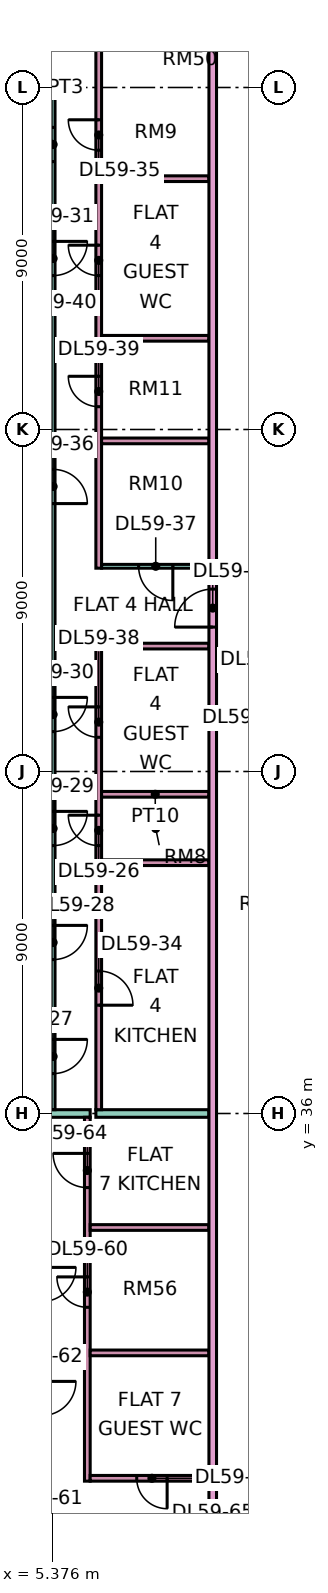
"""IFC4 building model, lengths in metres.
Left out: names, types, materials, properties, quantities, classifications, styles, units other than length and angle.
Written with IfcOpenShell. Run it as: python <this file> out.ifc"""

import sys

from ifc_helpers import new_model, si_unit, direction, frame, frame_2d, origin, place, context, subcontext, project, spatial, rectangle, extrude, element, fill, save


model = new_model("IFC4")
c1 = context("Model", 3, precision=1e-05, world=origin(), true_north=direction((0.0, 1.0)))
c2 = subcontext(c1, "Body", "Model", "MODEL_VIEW")
j1 = project(units=[si_unit("LENGTHUNIT", "METRE"), si_unit("PLANEANGLEUNIT", "RADIAN")], contexts=[c1])
p1 = place(None, origin())
s1 = spatial("IfcSite", under=j1, at=p1, CompositionType="ELEMENT")
p2 = place(p1, origin())
s2 = spatial("IfcBuilding", under=s1, at=p2, CompositionType="ELEMENT")
p3 = place(p2, frame((0.0, 0.0, 249.15)))
s3 = spatial("IfcBuildingStorey", under=s2, at=p3, CompositionType="ELEMENT", Elevation=249.15)
p4 = place(p3, frame((0.0, 36.0, 0.0), z_axis=(0.0, 0.0, 1.0), x_axis=(1.0, 0.0, 0.0)))
e1 = element("IfcWall", 1, at=p4, inside=s3, PredefinedType="PARTITIONING", context=c2, shape_type="SweptSolid", body=[
    extrude(rectangle(XDim=6.375, YDim=0.2, at=frame_2d((3.188, 0.0))), origin(), (0.0, 0.0, 1.0), 3.35),
])
p5 = place(p3, frame((5.4, 36.1, 0.0), z_axis=(0.0, 0.0, 1.0), x_axis=(0.0, 1.0, 0.0)))
e2 = element("IfcWall", 2, at=p5, inside=s3, PredefinedType="PARTITIONING", context=c2, shape_type="SweptSolid", body=[
    extrude(rectangle(XDim=26.95, YDim=0.1, at=frame_2d((13.475, 0.0))), origin(), (0.0, 0.0, 1.0), 3.35),
])
p6 = place(p5, frame((0.95, 0.0, 0.0)))
e3 = element("IfcOpeningElement", 3, at=p6, cuts=e2, PredefinedType="OPENING", context=c2, shape_type="SweptSolid", body=[
    extrude(rectangle(XDim=0.9, YDim=2.1, at=frame_2d((0.45, 1.05))), frame((0.0, 0.06, 0.0), z_axis=(0.0, -1.0, 0.0), x_axis=(1.0, 0.0, 0.0)), (0.0, 0.0, 1.0), 0.12),
])
p7 = place(p5, frame((3.95, 0.0, 0.0)))
e4 = element("IfcOpeningElement", 4, at=p7, cuts=e2, PredefinedType="OPENING", context=c2, shape_type="SweptSolid", body=[
    extrude(rectangle(XDim=0.9, YDim=2.1, at=frame_2d((0.45, 1.05))), frame((0.0, 0.06, 0.0), z_axis=(0.0, -1.0, 0.0), x_axis=(1.0, 0.0, 0.0)), (0.0, 0.0, 1.0), 0.12),
])
p8 = place(p5, frame((6.95, 0.0, 0.0)))
e5 = element("IfcOpeningElement", 5, at=p8, cuts=e2, PredefinedType="OPENING", context=c2, shape_type="SweptSolid", body=[
    extrude(rectangle(XDim=0.9, YDim=2.1, at=frame_2d((0.45, 1.05))), frame((0.0, 0.06, 0.0), z_axis=(0.0, -1.0, 0.0), x_axis=(1.0, 0.0, 0.0)), (0.0, 0.0, 1.0), 0.12),
])
p9 = place(p5, frame((9.95, 0.0, 0.0)))
e6 = element("IfcOpeningElement", 6, at=p9, cuts=e2, PredefinedType="OPENING", context=c2, shape_type="SweptSolid", body=[
    extrude(rectangle(XDim=0.9, YDim=2.1, at=frame_2d((0.45, 1.05))), frame((0.0, 0.06, 0.0), z_axis=(0.0, -1.0, 0.0), x_axis=(1.0, 0.0, 0.0)), (0.0, 0.0, 1.0), 0.12),
])
p10 = place(p5, frame((21.95, 0.0, 0.0)))
e7 = element("IfcOpeningElement", 7, at=p10, cuts=e2, PredefinedType="OPENING", context=c2, shape_type="SweptSolid", body=[
    extrude(rectangle(XDim=0.9, YDim=2.1, at=frame_2d((0.45, 1.05))), frame((0.0, 0.06, 0.0), z_axis=(0.0, -1.0, 0.0), x_axis=(1.0, 0.0, 0.0)), (0.0, 0.0, 1.0), 0.12),
])
p11 = place(p5, frame((24.95, 0.0, 0.0)))
e8 = element("IfcOpeningElement", 8, at=p11, cuts=e2, PredefinedType="OPENING", context=c2, shape_type="SweptSolid", body=[
    extrude(rectangle(XDim=0.9, YDim=2.1, at=frame_2d((0.45, 1.05))), frame((0.0, 0.06, 0.0), z_axis=(0.0, -1.0, 0.0), x_axis=(1.0, 0.0, 0.0)), (0.0, 0.0, 1.0), 0.12),
])
p12 = place(p5, frame((15.95, 0.0, 0.0)))
e9 = element("IfcOpeningElement", 9, at=p12, cuts=e2, PredefinedType="OPENING", context=c2, shape_type="SweptSolid", body=[
    extrude(rectangle(XDim=0.9, YDim=2.1, at=frame_2d((0.45, 1.05))), frame((0.0, 0.06, 0.0), z_axis=(0.0, -1.0, 0.0), x_axis=(1.0, 0.0, 0.0)), (0.0, 0.0, 1.0), 0.12),
])
p13 = place(p3, frame((5.45, 63.0, 0.0), z_axis=(0.0, 0.0, 1.0), x_axis=(1.0, 0.0, 0.0)))
e10 = element("IfcWall", 10, at=p13, inside=s3, PredefinedType="PARTITIONING", context=c2, shape_type="SweptSolid", body=[
    extrude(rectangle(XDim=0.55, YDim=0.1, at=frame_2d((0.275, 0.0))), origin(), (0.0, 0.0, 1.0), 3.35),
])
p14 = place(p3, frame((6.3, 26.325, 0.0), z_axis=(0.0, 0.0, 1.0), x_axis=(0.0, 1.0, 0.0)))
e11 = element("IfcWall", 11, at=p14, inside=s3, PredefinedType="PARTITIONING", context=c2, shape_type="SweptSolid", body=[
    extrude(rectangle(XDim=9.575, YDim=0.15, at=frame_2d((4.788, 0.0))), origin(), (0.0, 0.0, 1.0), 3.35),
])
p15 = place(p14, frame((4.575, 0.0, 0.0)))
e12 = element("IfcOpeningElement", 12, at=p15, cuts=e11, PredefinedType="OPENING", context=c2, shape_type="SweptSolid", body=[
    extrude(rectangle(XDim=0.8, YDim=2.1, at=frame_2d((0.4, 1.05))), frame((0.0, 0.085, 0.0), z_axis=(0.0, -1.0, 0.0), x_axis=(1.0, 0.0, 0.0)), (0.0, 0.0, 1.0), 0.17),
])
p16 = place(p14, frame((7.725, 0.0, 0.0)))
e13 = element("IfcOpeningElement", 13, at=p16, cuts=e11, PredefinedType="OPENING", context=c2, shape_type="SweptSolid", body=[
    extrude(rectangle(XDim=0.9, YDim=2.1, at=frame_2d((0.45, 1.05))), frame((0.0, 0.085, 0.0), z_axis=(0.0, -1.0, 0.0), x_axis=(1.0, 0.0, 0.0)), (0.0, 0.0, 1.0), 0.17),
])
p17 = place(p3, frame((6.375, 26.4, 0.0), z_axis=(0.0, 0.0, 1.0), x_axis=(1.0, 0.0, 0.0)))
e14 = element("IfcWall", 14, at=p17, inside=s3, PredefinedType="PARTITIONING", context=c2, shape_type="SweptSolid", body=[
    extrude(rectangle(XDim=3.125, YDim=0.15, at=frame_2d((1.562, 0.0))), origin(), (0.0, 0.0, 1.0), 3.35),
])
p18 = place(p17, frame((1.225, 0.0, 0.0)))
e15 = element("IfcOpeningElement", 15, at=p18, cuts=e14, PredefinedType="OPENING", context=c2, shape_type="SweptSolid", body=[
    extrude(rectangle(XDim=0.8, YDim=2.1, at=frame_2d((0.4, 1.05))), frame((0.0, 0.085, 0.0), z_axis=(0.0, -1.0, 0.0), x_axis=(1.0, 0.0, 0.0)), (0.0, 0.0, 1.0), 0.17),
])
for number, where, z_axis, x_axis in (
    (16, (6.375, 29.7, 0.0), (0.0, 0.0, 1.0), (1.0, 0.0, 0.0)),
    (17, (6.375, 33.0, 0.0), (0.0, 0.0, 1.0), (1.0, 0.0, 0.0)),
):
    element("IfcWall", number, at=place(p3, frame(where, z_axis=z_axis, x_axis=x_axis)), inside=s3, PredefinedType="PARTITIONING", context=c2, shape_type="SweptSolid", body=[
        extrude(rectangle(XDim=3.125, YDim=0.15, at=frame_2d((1.562, 0.0))), origin(), (0.0, 0.0, 1.0), 3.35),
    ])
p19 = place(p3, frame((6.525, 36.0, 0.0), z_axis=(0.0, 0.0, 1.0), x_axis=(1.0, 0.0, 0.0)))
e18 = element("IfcWall", 18, at=p19, inside=s3, PredefinedType="PARTITIONING", context=c2, shape_type="SweptSolid", body=[
    extrude(rectangle(XDim=2.975, YDim=0.2, at=frame_2d((1.488, 0.0))), origin(), (0.0, 0.0, 1.0), 3.35),
])
p20 = place(p3, frame((6.6, 36.1, 0.0), z_axis=(0.0, 0.0, 1.0), x_axis=(0.0, 1.0, 0.0)))
e19 = element("IfcWall", 19, at=p20, inside=s3, PredefinedType="PARTITIONING", context=c2, shape_type="SweptSolid", body=[
    extrude(rectangle(XDim=12.275, YDim=0.15, at=frame_2d((6.137, 0.0))), origin(), (0.0, 0.0, 1.0), 3.35),
])
p21 = place(p20, frame((6.95, 0.0, 0.0)))
e20 = element("IfcOpeningElement", 20, at=p21, cuts=e19, PredefinedType="OPENING", context=c2, shape_type="SweptSolid", body=[
    extrude(rectangle(XDim=0.8, YDim=2.1, at=frame_2d((0.4, 1.05))), frame((0.0, 0.085, 0.0), z_axis=(0.0, -1.0, 0.0), x_axis=(1.0, 0.0, 0.0)), (0.0, 0.0, 1.0), 0.17),
])
p22 = place(p20, frame((2.75, 0.0, 0.0)))
e21 = element("IfcOpeningElement", 21, at=p22, cuts=e19, PredefinedType="OPENING", context=c2, shape_type="SweptSolid", body=[
    extrude(rectangle(XDim=0.9, YDim=2.1, at=frame_2d((0.45, 1.05))), frame((0.0, 0.085, 0.0), z_axis=(0.0, -1.0, 0.0), x_axis=(1.0, 0.0, 0.0)), (0.0, 0.0, 1.0), 0.17),
])
p23 = place(p20, frame((9.8, 0.0, 0.0)))
e22 = element("IfcOpeningElement", 22, at=p23, cuts=e19, PredefinedType="OPENING", context=c2, shape_type="SweptSolid", body=[
    extrude(rectangle(XDim=0.8, YDim=2.1, at=frame_2d((0.4, 1.05))), frame((0.0, 0.085, 0.0), z_axis=(0.0, -1.0, 0.0), x_axis=(1.0, 0.0, 0.0)), (0.0, 0.0, 1.0), 0.17),
])
p24 = place(p3, frame((6.6, 50.35, 0.0), z_axis=(0.0, 0.0, 1.0), x_axis=(0.0, 1.0, 0.0)))
e23 = element("IfcWall", 23, at=p24, inside=s3, PredefinedType="PARTITIONING", context=c2, shape_type="SweptSolid", body=[
    extrude(rectangle(XDim=14.0, YDim=0.15, at=frame_2d((7.0, 0.0))), origin(), (0.0, 0.0, 1.0), 3.35),
])
p25 = place(p24, frame((11.0, 0.0, 0.0)))
e24 = element("IfcOpeningElement", 24, at=p25, cuts=e23, PredefinedType="OPENING", context=c2, shape_type="SweptSolid", body=[
    extrude(rectangle(XDim=0.8, YDim=2.1, at=frame_2d((0.4, 1.05))), frame((0.0, 0.085, 0.0), z_axis=(0.0, -1.0, 0.0), x_axis=(1.0, 0.0, 0.0)), (0.0, 0.0, 1.0), 0.17),
])
p26 = place(p24, frame((4.25, 0.0, 0.0)))
e25 = element("IfcOpeningElement", 25, at=p26, cuts=e23, PredefinedType="OPENING", context=c2, shape_type="SweptSolid", body=[
    extrude(rectangle(XDim=0.8, YDim=2.1, at=frame_2d((0.4, 1.05))), frame((0.0, 0.085, 0.0), z_axis=(0.0, -1.0, 0.0), x_axis=(1.0, 0.0, 0.0)), (0.0, 0.0, 1.0), 0.17),
])
p27 = place(p24, frame((7.7, 0.0, 0.0)))
e26 = element("IfcOpeningElement", 26, at=p27, cuts=e23, PredefinedType="OPENING", context=c2, shape_type="SweptSolid", body=[
    extrude(rectangle(XDim=0.8, YDim=2.1, at=frame_2d((0.4, 1.05))), frame((0.0, 0.085, 0.0), z_axis=(0.0, -1.0, 0.0), x_axis=(1.0, 0.0, 0.0)), (0.0, 0.0, 1.0), 0.17),
])
for number, where, z_axis, x_axis in (
    (27, (6.675, 42.6, 0.0), (0.0, 0.0, 1.0), (1.0, 0.0, 0.0)),
    (28, (6.675, 44.4, 0.0), (0.0, 0.0, 1.0), (1.0, 0.0, 0.0)),
    (29, (6.675, 48.3, 0.0), (0.0, 0.0, 1.0), (1.0, 0.0, 0.0)),
):
    element("IfcWall", number, at=place(p3, frame(where, z_axis=z_axis, x_axis=x_axis)), inside=s3, PredefinedType="PARTITIONING", context=c2, shape_type="SweptSolid", body=[
        extrude(rectangle(XDim=2.825, YDim=0.15, at=frame_2d((1.413, 0.0))), origin(), (0.0, 0.0, 1.0), 3.35),
    ])
p28 = place(p3, frame((6.675, 50.4, 0.0), z_axis=(0.0, 0.0, 1.0), x_axis=(1.0, 0.0, 0.0)))
e30 = element("IfcWall", 30, at=p28, inside=s3, PredefinedType="PARTITIONING", context=c2, shape_type="SweptSolid", body=[
    extrude(rectangle(XDim=2.825, YDim=0.1, at=frame_2d((1.413, 0.0))), origin(), (0.0, 0.0, 1.0), 3.35),
])
p29 = place(p28, frame((0.975, 0.0, 0.0)))
e31 = element("IfcOpeningElement", 31, at=p29, cuts=e30, PredefinedType="OPENING", context=c2, shape_type="SweptSolid", body=[
    extrude(rectangle(XDim=0.9, YDim=2.1, at=frame_2d((0.45, 1.05))), frame((0.0, 0.06, 0.0), z_axis=(0.0, -1.0, 0.0), x_axis=(1.0, 0.0, 0.0)), (0.0, 0.0, 1.0), 0.12),
])
for number, where, z_axis, x_axis in (
    (32, (6.675, 53.7, 0.0), (0.0, 0.0, 1.0), (1.0, 0.0, 0.0)),
    (33, (6.675, 56.4, 0.0), (0.0, 0.0, 1.0), (1.0, 0.0, 0.0)),
    (34, (6.675, 60.6, 0.0), (0.0, 0.0, 1.0), (1.0, 0.0, 0.0)),
):
    element("IfcWall", number, at=place(p3, frame(where, z_axis=z_axis, x_axis=x_axis)), inside=s3, PredefinedType="PARTITIONING", context=c2, shape_type="SweptSolid", body=[
        extrude(rectangle(XDim=2.825, YDim=0.15, at=frame_2d((1.413, 0.0))), origin(), (0.0, 0.0, 1.0), 3.35),
    ])
p30 = place(p3, frame((9.6, 20.0, 0.0), z_axis=(0.0, 0.0, 1.0), x_axis=(0.0, 1.0, 0.0)))
e35 = element("IfcWall", 35, at=p30, inside=s3, PredefinedType="PARTITIONING", context=c2, shape_type="SweptSolid", body=[
    extrude(rectangle(XDim=44.35, YDim=0.2, at=frame_2d((22.175, 0.0))), origin(), (0.0, 0.0, 1.0), 3.35),
])
p31 = place(p30, frame((28.8, 0.0, 0.0)))
e36 = element("IfcOpeningElement", 36, at=p31, cuts=e35, PredefinedType="OPENING", context=c2, shape_type="SweptSolid", body=[
    extrude(rectangle(XDim=1.0, YDim=2.1, at=frame_2d((0.5, 1.05))), frame((0.0, 0.11, 0.0), z_axis=(0.0, -1.0, 0.0), x_axis=(1.0, 0.0, 0.0)), (0.0, 0.0, 1.0), 0.22),
])
p32 = place(p30, frame((0.6, 0.0, 0.0)))
e37 = element("IfcOpeningElement", 37, at=p32, cuts=e35, PredefinedType="OPENING", context=c2, shape_type="SweptSolid", body=[
    extrude(rectangle(XDim=1.2, YDim=2.1, at=frame_2d((0.6, 1.05))), frame((0.0, 0.11, 0.0), z_axis=(0.0, -1.0, 0.0), x_axis=(1.0, 0.0, 0.0)), (0.0, 0.0, 1.0), 0.22),
])
p33 = place(p30, frame((3.9, 0.0, 0.0)))
e38 = element("IfcOpeningElement", 38, at=p33, cuts=e35, PredefinedType="OPENING", context=c2, shape_type="SweptSolid", body=[
    extrude(rectangle(XDim=1.0, YDim=2.1, at=frame_2d((0.5, 1.05))), frame((0.0, 0.11, 0.0), z_axis=(0.0, -1.0, 0.0), x_axis=(1.0, 0.0, 0.0)), (0.0, 0.0, 1.0), 0.22),
])
p34 = place(p21, frame((0.8, 0.0, 0.0), z_axis=(0.0, 0.0, 1.0), x_axis=(-1.0, 0.0, 0.0)))
e39 = element("IfcDoor", 39, at=p34, inside=s3, OperationType="SINGLE_SWING_RIGHT", PredefinedType="DOOR", context=c2, shape_type="SweptSolid", body=[
    extrude(rectangle(XDim=0.8, YDim=2.1, at=frame_2d((0.4, 1.05))), frame((0.0, 0.025, 0.0), z_axis=(0.0, -1.0, 0.0), x_axis=(1.0, 0.0, 0.0)), (0.0, 0.0, 1.0), 0.05),
])
fill(e20, e39)
p35 = place(p6, origin())
e40 = element("IfcDoor", 40, at=p35, inside=s3, OperationType="SINGLE_SWING_RIGHT", PredefinedType="DOOR", context=c2, shape_type="SweptSolid", body=[
    extrude(rectangle(XDim=0.9, YDim=2.1, at=frame_2d((0.45, 1.05))), frame((0.0, 0.025, 0.0), z_axis=(0.0, -1.0, 0.0), x_axis=(1.0, 0.0, 0.0)), (0.0, 0.0, 1.0), 0.05),
])
fill(e3, e40)
p36 = place(p7, origin())
e41 = element("IfcDoor", 41, at=p36, inside=s3, OperationType="SINGLE_SWING_RIGHT", PredefinedType="DOOR", context=c2, shape_type="SweptSolid", body=[
    extrude(rectangle(XDim=0.9, YDim=2.1, at=frame_2d((0.45, 1.05))), frame((0.0, 0.025, 0.0), z_axis=(0.0, -1.0, 0.0), x_axis=(1.0, 0.0, 0.0)), (0.0, 0.0, 1.0), 0.05),
])
fill(e4, e41)
p37 = place(p8, origin())
e42 = element("IfcDoor", 42, at=p37, inside=s3, OperationType="SINGLE_SWING_RIGHT", PredefinedType="DOOR", context=c2, shape_type="SweptSolid", body=[
    extrude(rectangle(XDim=0.9, YDim=2.1, at=frame_2d((0.45, 1.05))), frame((0.0, 0.025, 0.0), z_axis=(0.0, -1.0, 0.0), x_axis=(1.0, 0.0, 0.0)), (0.0, 0.0, 1.0), 0.05),
])
fill(e5, e42)
p38 = place(p9, origin())
e43 = element("IfcDoor", 43, at=p38, inside=s3, OperationType="SINGLE_SWING_RIGHT", PredefinedType="DOOR", context=c2, shape_type="SweptSolid", body=[
    extrude(rectangle(XDim=0.9, YDim=2.1, at=frame_2d((0.45, 1.05))), frame((0.0, 0.025, 0.0), z_axis=(0.0, -1.0, 0.0), x_axis=(1.0, 0.0, 0.0)), (0.0, 0.0, 1.0), 0.05),
])
fill(e6, e43)
p39 = place(p10, origin())
e44 = element("IfcDoor", 44, at=p39, inside=s3, OperationType="SINGLE_SWING_RIGHT", PredefinedType="DOOR", context=c2, shape_type="SweptSolid", body=[
    extrude(rectangle(XDim=0.9, YDim=2.1, at=frame_2d((0.45, 1.05))), frame((0.0, 0.025, 0.0), z_axis=(0.0, -1.0, 0.0), x_axis=(1.0, 0.0, 0.0)), (0.0, 0.0, 1.0), 0.05),
])
fill(e7, e44)
p40 = place(p11, origin())
e45 = element("IfcDoor", 45, at=p40, inside=s3, OperationType="SINGLE_SWING_LEFT", PredefinedType="DOOR", context=c2, shape_type="SweptSolid", body=[
    extrude(rectangle(XDim=0.9, YDim=2.1, at=frame_2d((0.45, 1.05))), frame((0.0, 0.025, 0.0), z_axis=(0.0, -1.0, 0.0), x_axis=(1.0, 0.0, 0.0)), (0.0, 0.0, 1.0), 0.05),
])
fill(e8, e45)
p41 = place(p31, origin())
e46 = element("IfcDoor", 46, at=p41, inside=s3, OperationType="SINGLE_SWING_LEFT", PredefinedType="DOOR", context=c2, shape_type="SweptSolid", body=[
    extrude(rectangle(XDim=1.0, YDim=2.1, at=frame_2d((0.5, 1.05))), frame((0.0, 0.025, 0.0), z_axis=(0.0, -1.0, 0.0), x_axis=(1.0, 0.0, 0.0)), (0.0, 0.0, 1.0), 0.05),
])
fill(e36, e46)
p42 = place(p22, frame((0.9, 0.0, 0.0), z_axis=(0.0, 0.0, 1.0), x_axis=(-1.0, 0.0, 0.0)))
e47 = element("IfcDoor", 47, at=p42, inside=s3, OperationType="SINGLE_SWING_LEFT", PredefinedType="DOOR", context=c2, shape_type="SweptSolid", body=[
    extrude(rectangle(XDim=0.9, YDim=2.1, at=frame_2d((0.45, 1.05))), frame((0.0, 0.025, 0.0), z_axis=(0.0, -1.0, 0.0), x_axis=(1.0, 0.0, 0.0)), (0.0, 0.0, 1.0), 0.05),
])
fill(e21, e47)
p43 = place(p25, frame((0.8, 0.0, 0.0), z_axis=(0.0, 0.0, 1.0), x_axis=(-1.0, 0.0, 0.0)))
e48 = element("IfcDoor", 48, at=p43, inside=s3, OperationType="SINGLE_SWING_RIGHT", PredefinedType="DOOR", context=c2, shape_type="SweptSolid", body=[
    extrude(rectangle(XDim=0.8, YDim=2.1, at=frame_2d((0.4, 1.05))), frame((0.0, 0.025, 0.0), z_axis=(0.0, -1.0, 0.0), x_axis=(1.0, 0.0, 0.0)), (0.0, 0.0, 1.0), 0.05),
])
fill(e24, e48)
p44 = place(p12, frame((0.9, 0.0, 0.0), z_axis=(0.0, 0.0, 1.0), x_axis=(-1.0, 0.0, 0.0)))
e49 = element("IfcDoor", 49, at=p44, inside=s3, OperationType="SINGLE_SWING_LEFT", PredefinedType="DOOR", context=c2, shape_type="SweptSolid", body=[
    extrude(rectangle(XDim=0.9, YDim=2.1, at=frame_2d((0.45, 1.05))), frame((0.0, 0.025, 0.0), z_axis=(0.0, -1.0, 0.0), x_axis=(1.0, 0.0, 0.0)), (0.0, 0.0, 1.0), 0.05),
])
fill(e9, e49)
p45 = place(p29, origin())
e50 = element("IfcDoor", 50, at=p45, inside=s3, OperationType="SINGLE_SWING_RIGHT", PredefinedType="DOOR", context=c2, shape_type="SweptSolid", body=[
    extrude(rectangle(XDim=0.9, YDim=2.1, at=frame_2d((0.45, 1.05))), frame((0.0, 0.025, 0.0), z_axis=(0.0, -1.0, 0.0), x_axis=(1.0, 0.0, 0.0)), (0.0, 0.0, 1.0), 0.05),
])
fill(e31, e50)
p46 = place(p23, frame((0.8, 0.0, 0.0), z_axis=(0.0, 0.0, 1.0), x_axis=(-1.0, 0.0, 0.0)))
e51 = element("IfcDoor", 51, at=p46, inside=s3, OperationType="SINGLE_SWING_RIGHT", PredefinedType="DOOR", context=c2, shape_type="SweptSolid", body=[
    extrude(rectangle(XDim=0.8, YDim=2.1, at=frame_2d((0.4, 1.05))), frame((0.0, 0.025, 0.0), z_axis=(0.0, -1.0, 0.0), x_axis=(1.0, 0.0, 0.0)), (0.0, 0.0, 1.0), 0.05),
])
fill(e22, e51)
p47 = place(p26, frame((0.8, 0.0, 0.0), z_axis=(0.0, 0.0, 1.0), x_axis=(-1.0, 0.0, 0.0)))
e52 = element("IfcDoor", 52, at=p47, inside=s3, OperationType="SINGLE_SWING_RIGHT", PredefinedType="DOOR", context=c2, shape_type="SweptSolid", body=[
    extrude(rectangle(XDim=0.8, YDim=2.1, at=frame_2d((0.4, 1.05))), frame((0.0, 0.025, 0.0), z_axis=(0.0, -1.0, 0.0), x_axis=(1.0, 0.0, 0.0)), (0.0, 0.0, 1.0), 0.05),
])
fill(e25, e52)
p48 = place(p27, frame((0.8, 0.0, 0.0), z_axis=(0.0, 0.0, 1.0), x_axis=(-1.0, 0.0, 0.0)))
e53 = element("IfcDoor", 53, at=p48, inside=s3, OperationType="SINGLE_SWING_RIGHT", PredefinedType="DOOR", context=c2, shape_type="SweptSolid", body=[
    extrude(rectangle(XDim=0.8, YDim=2.1, at=frame_2d((0.4, 1.05))), frame((0.0, 0.025, 0.0), z_axis=(0.0, -1.0, 0.0), x_axis=(1.0, 0.0, 0.0)), (0.0, 0.0, 1.0), 0.05),
])
fill(e26, e53)
p49 = place(p15, frame((0.8, 0.0, 0.0), z_axis=(0.0, 0.0, 1.0), x_axis=(-1.0, 0.0, 0.0)))
e54 = element("IfcDoor", 54, at=p49, inside=s3, OperationType="SINGLE_SWING_RIGHT", PredefinedType="DOOR", context=c2, shape_type="SweptSolid", body=[
    extrude(rectangle(XDim=0.8, YDim=2.1, at=frame_2d((0.4, 1.05))), frame((0.0, 0.025, 0.0), z_axis=(0.0, -1.0, 0.0), x_axis=(1.0, 0.0, 0.0)), (0.0, 0.0, 1.0), 0.05),
])
fill(e12, e54)
p50 = place(p16, frame((0.9, 0.0, 0.0), z_axis=(0.0, 0.0, 1.0), x_axis=(-1.0, 0.0, 0.0)))
e55 = element("IfcDoor", 55, at=p50, inside=s3, OperationType="SINGLE_SWING_RIGHT", PredefinedType="DOOR", context=c2, shape_type="SweptSolid", body=[
    extrude(rectangle(XDim=0.9, YDim=2.1, at=frame_2d((0.45, 1.05))), frame((0.0, 0.025, 0.0), z_axis=(0.0, -1.0, 0.0), x_axis=(1.0, 0.0, 0.0)), (0.0, 0.0, 1.0), 0.05),
])
fill(e13, e55)
p51 = place(p18, origin())
e56 = element("IfcDoor", 56, at=p51, inside=s3, OperationType="SINGLE_SWING_RIGHT", PredefinedType="DOOR", context=c2, shape_type="SweptSolid", body=[
    extrude(rectangle(XDim=0.8, YDim=2.1, at=frame_2d((0.4, 1.05))), frame((0.0, 0.025, 0.0), z_axis=(0.0, -1.0, 0.0), x_axis=(1.0, 0.0, 0.0)), (0.0, 0.0, 1.0), 0.05),
])
fill(e15, e56)
save(model, sys.argv[1])
